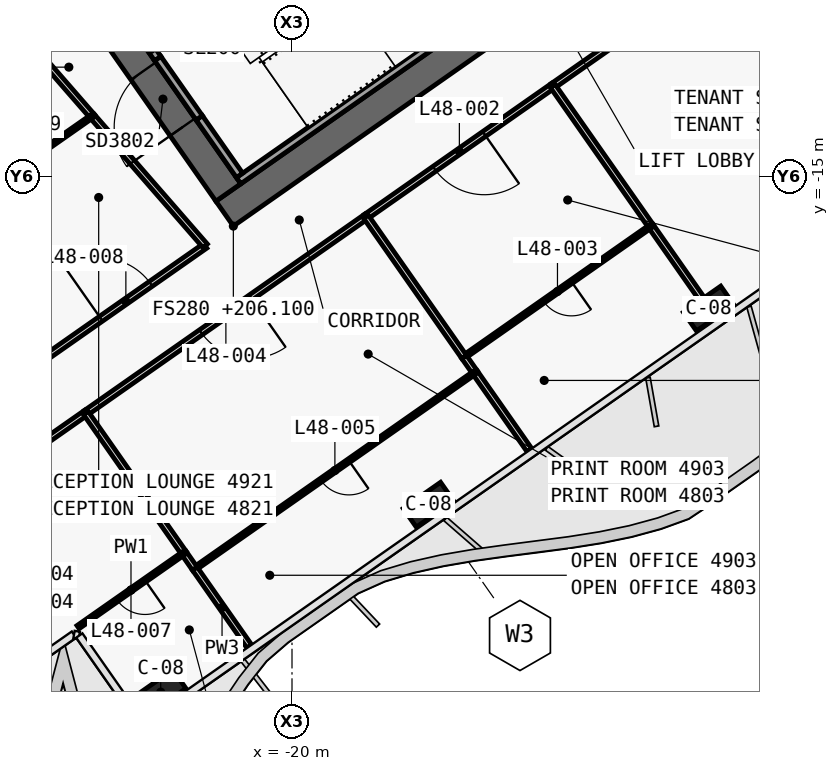
"""IFC4 building model, lengths in metres.
Left out: names, types, materials, properties, quantities, classifications, styles, units other than length and angle.
Written with IfcOpenShell. Run it as: python <this file> out.ifc"""

import sys

from ifc_helpers import new_model, si_unit, direction, frame, frame_2d, origin, origin_2d, place, context, subcontext, project, spatial, polyline, rectangle, outline, extrude, element, fill, save


model = new_model("IFC4")
c1 = context("Model", 3, precision=1e-05, world=origin(), true_north=direction((0.0, 1.0)))
c2 = subcontext(c1, "Body", "Model", "MODEL_VIEW")
j1 = project(units=[si_unit("LENGTHUNIT", "METRE"), si_unit("PLANEANGLEUNIT", "RADIAN")], contexts=[c1])
p1 = place(None, origin())
s1 = spatial("IfcSite", under=j1, at=p1, CompositionType="ELEMENT")
p2 = place(p1, origin())
s2 = spatial("IfcBuilding", under=s1, at=p2, CompositionType="ELEMENT")
p3 = place(p2, frame((0.0, 0.0, 206.1)))
s3 = spatial("IfcBuildingStorey", under=s2, at=p3, CompositionType="ELEMENT", Elevation=206.1)
p4 = place(p3, frame((0.029, -0.712, 0.0), z_axis=(0.0, 0.0, 1.0), x_axis=(-0.819151758019, -0.573576845187, 0.0)))
e1 = element("IfcWall", 1, at=p4, inside=s3, PredefinedType="SHEAR", context=c2, shape_type="SweptSolid", body=[
    extrude(outline(polyline([(26.616, 0.4), (0.56, 0.4), (-0.0, -0.4), (26.616, -0.4), (26.616, 0.4)])), origin(), (0.0, 0.0, 1.0), 3.9),
])
p5 = place(p4, frame((2.966, 0.0, 0.0)))
e2 = element("IfcOpeningElement", 2, at=p5, cuts=e1, PredefinedType="OPENING", context=c2, shape_type="SweptSolid", body=[
    extrude(rectangle(XDim=2.4, YDim=2.1, at=frame_2d((1.2, 1.05))), frame((0.0, 0.41, 0.0), z_axis=(0.0, -1.0, 0.0), x_axis=(1.0, 0.0, 0.0)), (0.0, 0.0, 1.0), 0.82),
])
p6 = place(p4, frame((11.916, 0.0, 0.0)))
e3 = element("IfcOpeningElement", 3, at=p6, cuts=e1, PredefinedType="OPENING", context=c2, shape_type="SweptSolid", body=[
    extrude(rectangle(XDim=2.4, YDim=2.1, at=frame_2d((1.2, 1.05))), frame((0.0, 0.41, 0.0), z_axis=(0.0, -1.0, 0.0), x_axis=(1.0, 0.0, 0.0)), (0.0, 0.0, 1.0), 0.82),
])
p7 = place(p3, frame((-21.675, -15.421, 0.0), z_axis=(0.0, 0.0, 1.0), x_axis=(-0.573581815061, 0.819148278049, 0.0)))
e4 = element("IfcWall", 4, at=p7, inside=s3, PredefinedType="SHEAR", context=c2, shape_type="SweptSolid", body=[
    extrude(outline(polyline([(0.0, 0.4), (0.0, -0.4), (9.6, -0.4), (9.6, 0.4), (0.0, 0.4)])), origin(), (0.0, 0.0, 1.0), 3.9),
])
p8 = place(p7, frame((6.3, 0.0, 0.0)))
e5 = element("IfcOpeningElement", 5, at=p8, cuts=e4, PredefinedType="OPENING", context=c2, shape_type="SweptSolid", body=[
    extrude(rectangle(XDim=1.8, YDim=2.1, at=frame_2d((0.9, 1.05))), frame((0.0, 0.41, 0.0), z_axis=(0.0, -1.0, 0.0), x_axis=(1.0, 0.0, 0.0)), (0.0, 0.0, 1.0), 0.82),
])
p9 = place(p7, frame((2.1, 0.0, 0.0)))
e6 = element("IfcOpeningElement", 6, at=p9, cuts=e4, PredefinedType="OPENING", context=c2, shape_type="SweptSolid", body=[
    extrude(rectangle(XDim=1.8, YDim=2.1, at=frame_2d((0.9, 1.05))), frame((0.0, 0.41, 0.0), z_axis=(0.0, -1.0, 0.0), x_axis=(1.0, 0.0, 0.0)), (0.0, 0.0, 1.0), 0.82),
])
for number, where, z_axis, x_axis in (
    (7, (-9.038, -18.475, 0.0), (0.0, 0.0, 1.0), (-0.819, -0.574, 0.0)),
    (8, (-16.41, -23.637, 0.0), (0.0, 0.0, 1.0), (-0.819, -0.574, 0.0)),
    (9, (-23.455, -28.57, 0.0), (0.0, 0.0, 1.0), (-0.819, -0.574, 0.0)),
):
    element("IfcColumn", number, at=place(p3, frame(where, z_axis=z_axis, x_axis=x_axis)), inside=s3, PredefinedType="COLUMN", context=c2, shape_type="SweptSolid", body=[
        extrude(rectangle(XDim=1.2, YDim=0.6, at=origin_2d()), origin(), (0.0, 0.0, 1.0), 3.9),
    ])
p10 = place(p3, frame((-14.851, -10.521, 0.0), z_axis=(0.0, 0.0, 1.0), x_axis=(-0.819141584393, -0.57359137434, 0.0)))
e10 = element("IfcWall", 10, at=p10, inside=s3, PredefinedType="SOLIDWALL", context=c2, shape_type="SweptSolid", body=[
    extrude(rectangle(XDim=8.0, YDim=0.2, at=frame_2d((4.0, 0.0))), origin(), (0.0, 0.0, 1.0), 3.62),
])
p11 = place(p3, frame((-21.38, -14.97, 0.0), z_axis=(0.0, 0.0, 1.0), x_axis=(-0.573559770908, 0.819163713305, 0.0)))
e11 = element("IfcWall", 11, at=p11, inside=s3, PredefinedType="SOLIDWALL", context=c2, shape_type="SweptSolid", body=[
    extrude(rectangle(XDim=1.85, YDim=0.2, at=frame_2d((0.925, 0.0))), origin(), (0.0, 0.0, 1.0), 3.62),
])
p12 = place(p3, frame((-23.531, -11.898, 0.0), z_axis=(0.0, 0.0, 1.0), x_axis=(-0.573708088123, 0.819059844958, 0.0)))
e12 = element("IfcWall", 12, at=p12, inside=s3, PredefinedType="SOLIDWALL", context=c2, shape_type="SweptSolid", body=[
    extrude(rectangle(XDim=0.6, YDim=0.2, at=frame_2d((0.3, 0.0))), origin(), (0.0, 0.0, 1.0), 3.62),
])
p13 = place(p3, frame((-22.441, -13.455, 2.15), z_axis=(0.0, 0.0, 1.0), x_axis=(-0.573591692345, 0.819141361715, 0.0)))
e13 = element("IfcWall", 13, at=p13, inside=s3, PredefinedType="SOLIDWALL", context=c2, shape_type="SweptSolid", body=[
    extrude(rectangle(XDim=1.9, YDim=0.2, at=frame_2d((0.95, 0.0))), origin(), (0.0, 0.0, 1.0), 1.47),
])
p14 = place(p3, frame((-26.46, -19.748, 0.0), z_axis=(0.0, 0.0, 1.0), x_axis=(0.819171182807, 0.573549102744, 0.0)))
e14 = element("IfcWall", 14, at=p14, inside=s3, PredefinedType="PARTITIONING", context=c2, shape_type="SweptSolid", body=[
    extrude(rectangle(XDim=5.099, YDim=0.15, at=frame_2d((2.55, 0.0))), origin(), (0.0, 0.0, 1.0), 3.62),
])
p15 = place(p14, frame((1.75, 0.0, 0.0)))
e15 = element("IfcOpeningElement", 15, at=p15, cuts=e14, PredefinedType="OPENING", context=c2, shape_type="SweptSolid", body=[
    extrude(rectangle(XDim=1.6, YDim=2.1, at=frame_2d((0.8, 1.05))), frame((0.0, 0.085, 0.0), z_axis=(0.0, -1.0, 0.0), x_axis=(1.0, 0.0, 0.0)), (0.0, 0.0, 1.0), 0.17),
])
p16 = place(p3, frame((-5.766, -7.456, 0.0), z_axis=(0.0, 0.0, 1.0), x_axis=(-0.81915291695, -0.57357519006, 0.0)))
e16 = element("IfcWall", 16, at=p16, inside=s3, PredefinedType="PARTITIONING", context=c2, shape_type="SweptSolid", body=[
    extrude(rectangle(XDim=9.002, YDim=0.15, at=frame_2d((4.501, 0.0))), origin(), (0.0, 0.0, 1.0), 3.0),
])
p17 = place(p16, frame((3.701, 0.0, 0.0)))
e17 = element("IfcOpeningElement", 17, at=p17, cuts=e16, PredefinedType="OPENING", context=c2, shape_type="SweptSolid", body=[
    extrude(rectangle(XDim=1.6, YDim=2.1, at=frame_2d((0.8, 1.05))), frame((0.0, 0.085, 0.0), z_axis=(0.0, -1.0, 0.0), x_axis=(1.0, 0.0, 0.0)), (0.0, 0.0, 1.0), 0.17),
])
p18 = place(p3, frame((-13.137, -12.617, 0.0), z_axis=(0.0, 0.0, 1.0), x_axis=(-0.819165052243, -0.573557858619, 0.0)))
e18 = element("IfcWall", 18, at=p18, inside=s3, PredefinedType="PARTITIONING", context=c2, shape_type="SweptSolid", body=[
    extrude(rectangle(XDim=6.004, YDim=0.15, at=frame_2d((3.002, 0.0))), origin(), (0.0, 0.0, 1.0), 3.0),
])
p19 = place(p18, frame((2.202, 0.0, 0.0)))
e19 = element("IfcOpeningElement", 19, at=p19, cuts=e18, PredefinedType="OPENING", context=c2, shape_type="SweptSolid", body=[
    extrude(rectangle(XDim=1.6, YDim=2.1, at=frame_2d((0.8, 1.05))), frame((0.0, 0.085, 0.0), z_axis=(0.0, -1.0, 0.0), x_axis=(1.0, 0.0, 0.0)), (0.0, 0.0, 1.0), 0.17),
])
p20 = place(p3, frame((-18.052, -16.058, 0.0), z_axis=(0.0, 0.0, 1.0), x_axis=(-0.819142740634, -0.573589723117, 0.0)))
e20 = element("IfcWall", 20, at=p20, inside=s3, PredefinedType="PARTITIONING", context=c2, shape_type="SweptSolid", body=[
    extrude(rectangle(XDim=9.004, YDim=0.15, at=frame_2d((4.502, 0.0))), origin(), (0.0, 0.0, 1.0), 3.0),
])
p21 = place(p20, frame((3.702, 0.0, 0.0)))
e21 = element("IfcOpeningElement", 21, at=p21, cuts=e20, PredefinedType="OPENING", context=c2, shape_type="SweptSolid", body=[
    extrude(rectangle(XDim=1.6, YDim=2.1, at=frame_2d((0.8, 1.05))), frame((0.0, 0.085, 0.0), z_axis=(0.0, -1.0, 0.0), x_axis=(1.0, 0.0, 0.0)), (0.0, 0.0, 1.0), 0.17),
])
p22 = place(p3, frame((-25.424, -21.22, 0.0), z_axis=(0.0, 0.0, 1.0), x_axis=(-0.819154877477, -0.573572390118, 0.0)))
e22 = element("IfcWall", 22, at=p22, inside=s3, PredefinedType="PARTITIONING", context=c2, shape_type="SweptSolid", body=[
    extrude(rectangle(XDim=6.402, YDim=0.15, at=frame_2d((3.201, 0.0))), origin(), (0.0, 0.0, 1.0), 2.9),
])
p23 = place(p22, frame((2.401, 0.0, 0.0)))
e23 = element("IfcOpeningElement", 23, at=p23, cuts=e22, PredefinedType="OPENING", context=c2, shape_type="SweptSolid", body=[
    extrude(rectangle(XDim=1.6, YDim=2.1, at=frame_2d((0.8, 1.05))), frame((0.0, 0.085, 0.0), z_axis=(0.0, -1.0, 0.0), x_axis=(1.0, 0.0, 0.0)), (0.0, 0.0, 1.0), 0.17),
])
p24 = place(p3, frame((-25.256, -13.413, 0.0), z_axis=(0.0, 0.0, 1.0), x_axis=(-0.656776293518, 0.75408547279, 0.0)))
e24 = element("IfcWall", 24, at=p24, inside=s3, PredefinedType="PARTITIONING", context=c2, shape_type="SweptSolid", body=[
    extrude(rectangle(XDim=2.012, YDim=0.15, at=frame_2d((1.006, 0.0))), origin(), (0.0, 0.0, 1.0), 3.62),
])
p25 = place(p3, frame((-22.284, -16.826, 0.0), z_axis=(0.0, 0.0, 1.0), x_axis=(-0.656755036803, 0.754103985955, 0.0)))
e25 = element("IfcWall", 25, at=p25, inside=s3, PredefinedType="PARTITIONING", context=c2, shape_type="SweptSolid", body=[
    extrude(rectangle(XDim=4.529, YDim=0.15, at=frame_2d((2.265, 0.0))), origin(), (0.0, 0.0, 1.0), 3.62),
])
p26 = place(p3, frame((-29.04, -16.06, 0.0), z_axis=(0.0, 0.0, 1.0), x_axis=(0.819135037256, 0.573600724145, 0.0)))
e26 = element("IfcWall", 26, at=p26, inside=s3, PredefinedType="PARTITIONING", context=c2, shape_type="SweptSolid", body=[
    extrude(rectangle(XDim=4.618, YDim=0.1, at=frame_2d((2.309, 0.0))), origin(), (0.0, 0.0, 1.0), 3.62),
])
p27 = place(p26, frame((1.859, 0.0, 0.0)))
e27 = element("IfcOpeningElement", 27, at=p27, cuts=e26, PredefinedType="OPENING", context=c2, shape_type="SweptSolid", body=[
    extrude(rectangle(XDim=0.9, YDim=2.1, at=frame_2d((0.45, 1.05))), frame((0.0, 0.06, 0.0), z_axis=(0.0, -1.0, 0.0), x_axis=(1.0, 0.0, 0.0)), (0.0, 0.0, 1.0), 0.12),
])
p28 = place(p3, frame((-9.221, -18.213, 0.0), z_axis=(0.0, 0.0, 1.0), x_axis=(-0.573553724287, 0.819167946978, 0.0)))
e28 = element("IfcWall", 28, at=p28, inside=s3, PredefinedType="PARTITIONING", context=c2, shape_type="SweptSolid", body=[
    extrude(rectangle(XDim=2.331, YDim=0.15, at=frame_2d((1.166, 0.0))), origin(), (0.0, 0.0, 1.0), 3.0),
])
p29 = place(p3, frame((-10.556, -16.306, 0.0), z_axis=(0.0, 0.0, 1.0), x_axis=(-0.573564243949, 0.819160581365, 0.0)))
e29 = element("IfcWall", 29, at=p29, inside=s3, PredefinedType="PARTITIONING", context=c2, shape_type="SweptSolid", body=[
    extrude(rectangle(XDim=4.502, YDim=0.15, at=frame_2d((2.251, 0.0))), origin(), (0.0, 0.0, 1.0), 3.0),
])
p30 = place(p3, frame((-10.557, -16.305, 0.0), z_axis=(0.0, 0.0, 1.0), x_axis=(-0.819130592339, -0.573607071691, 0.0)))
e30 = element("IfcWall", 30, at=p30, inside=s3, PredefinedType="PARTITIONING", context=c2, shape_type="SweptSolid", body=[
    extrude(rectangle(XDim=6.0, YDim=0.1, at=frame_2d((3.0, 0.0))), origin(), (0.0, 0.0, 1.0), 3.0),
])
p31 = place(p30, frame((2.55, 0.0, 0.0)))
e31 = element("IfcOpeningElement", 31, at=p31, cuts=e30, PredefinedType="OPENING", context=c2, shape_type="SweptSolid", body=[
    extrude(rectangle(XDim=0.9, YDim=2.1, at=frame_2d((0.45, 1.05))), frame((0.0, 0.06, 0.0), z_axis=(0.0, -1.0, 0.0), x_axis=(1.0, 0.0, 0.0)), (0.0, 0.0, 1.0), 0.12),
])
p32 = place(p3, frame((-13.752, -22.203, 0.0), z_axis=(0.0, 0.0, 1.0), x_axis=(-0.57356715775, 0.819158541157, 0.0)))
e32 = element("IfcWall", 32, at=p32, inside=s3, PredefinedType="PARTITIONING", context=c2, shape_type="SweptSolid", body=[
    extrude(rectangle(XDim=2.501, YDim=0.15, at=frame_2d((1.25, 0.0))), origin(), (0.0, 0.0, 1.0), 2.9),
])
p33 = place(p3, frame((-15.185, -20.157, 0.0), z_axis=(0.0, 0.0, 1.0), x_axis=(-0.573560455774, 0.819163233777, 0.0)))
e33 = element("IfcWall", 33, at=p33, inside=s3, PredefinedType="PARTITIONING", context=c2, shape_type="SweptSolid", body=[
    extrude(rectangle(XDim=0.501, YDim=0.15, at=frame_2d((0.25, 0.0))), origin(), (0.0, 0.0, 1.0), 3.62),
])
p34 = place(p3, frame((-15.472, -19.746, 0.0), z_axis=(0.0, 0.0, 1.0), x_axis=(-0.573622545156, 0.819119756622, 0.0)))
e34 = element("IfcWall", 34, at=p34, inside=s3, PredefinedType="PARTITIONING", context=c2, shape_type="SweptSolid", body=[
    extrude(rectangle(XDim=4.5, YDim=0.15, at=frame_2d((2.25, 0.0))), origin(), (0.0, 0.0, 1.0), 3.62),
])
p35 = place(p3, frame((-15.185, -20.156, 0.0), z_axis=(0.0, 0.0, 1.0), x_axis=(-0.819154173185, -0.573573395961, 0.0)))
e35 = element("IfcWall", 35, at=p35, inside=s3, PredefinedType="PARTITIONING", context=c2, shape_type="SweptSolid", body=[
    extrude(rectangle(XDim=9.0, YDim=0.1, at=frame_2d((4.5, 0.0))), origin(), (0.0, 0.0, 1.0), 3.0),
])
p36 = place(p35, frame((4.05, 0.0, 0.0)))
e36 = element("IfcOpeningElement", 36, at=p36, cuts=e35, PredefinedType="OPENING", context=c2, shape_type="SweptSolid", body=[
    extrude(rectangle(XDim=0.9, YDim=2.1, at=frame_2d((0.45, 1.05))), frame((0.0, 0.06, 0.0), z_axis=(0.0, -1.0, 0.0), x_axis=(1.0, 0.0, 0.0)), (0.0, 0.0, 1.0), 0.12),
])
p37 = place(p3, frame((-21.124, -27.365, 0.0), z_axis=(0.0, 0.0, 1.0), x_axis=(-0.573560689761, 0.819163069945, 0.0)))
e37 = element("IfcWall", 37, at=p37, inside=s3, PredefinedType="PARTITIONING", context=c2, shape_type="SweptSolid", body=[
    extrude(rectangle(XDim=2.499, YDim=0.15, at=frame_2d((1.25, 0.0))), origin(), (0.0, 0.0, 1.0), 2.9),
])
p38 = place(p3, frame((-22.558, -25.317, 0.0), z_axis=(0.0, 0.0, 1.0), x_axis=(-0.573560455774, 0.819163233777, 0.0)))
e38 = element("IfcWall", 38, at=p38, inside=s3, PredefinedType="PARTITIONING", context=c2, shape_type="SweptSolid", body=[
    extrude(rectangle(XDim=0.501, YDim=0.15, at=frame_2d((0.25, 0.0))), origin(), (0.0, 0.0, 1.0), 3.62),
])
p39 = place(p3, frame((-22.844, -24.909, 0.0), z_axis=(0.0, 0.0, 1.0), x_axis=(-0.573589723117, 0.819142740634, 0.0)))
e39 = element("IfcWall", 39, at=p39, inside=s3, PredefinedType="PARTITIONING", context=c2, shape_type="SweptSolid", body=[
    extrude(rectangle(XDim=4.502, YDim=0.15, at=frame_2d((2.251, 0.0))), origin(), (0.0, 0.0, 1.0), 3.62),
])
p40 = place(p3, frame((-22.844, -24.909, 0.0), z_axis=(0.0, 0.0, 1.0), x_axis=(-0.819150951061, -0.57357799764, 0.0)))
e40 = element("IfcWall", 40, at=p40, inside=s3, PredefinedType="PARTITIONING", context=c2, shape_type="SweptSolid", body=[
    extrude(rectangle(XDim=3.4, YDim=0.1, at=frame_2d((1.7, 0.0))), origin(), (0.0, 0.0, 1.0), 3.0),
])
p41 = place(p40, frame((1.25, 0.0, 0.0)))
e41 = element("IfcOpeningElement", 41, at=p41, cuts=e40, PredefinedType="OPENING", context=c2, shape_type="SweptSolid", body=[
    extrude(rectangle(XDim=0.9, YDim=2.1, at=frame_2d((0.45, 1.05))), frame((0.0, 0.06, 0.0), z_axis=(0.0, -1.0, 0.0), x_axis=(1.0, 0.0, 0.0)), (0.0, 0.0, 1.0), 0.12),
])
p42 = place(p9, origin())
e42 = element("IfcDoor", 42, at=p42, inside=s3, OperationType="DOUBLE_DOOR_SINGLE_SWING", PredefinedType="DOOR", context=c2, shape_type="SweptSolid", body=[
    extrude(rectangle(XDim=1.8, YDim=2.1, at=frame_2d((0.9, 1.05))), frame((0.0, 0.025, 0.0), z_axis=(0.0, -1.0, 0.0), x_axis=(1.0, 0.0, 0.0)), (0.0, 0.0, 1.0), 0.05),
])
fill(e6, e42)
p43 = place(p19, origin())
e43 = element("IfcDoor", 43, at=p43, inside=s3, OperationType="DOUBLE_DOOR_SINGLE_SWING", PredefinedType="DOOR", context=c2, shape_type="SweptSolid", body=[
    extrude(rectangle(XDim=1.6, YDim=2.1, at=frame_2d((0.8, 1.05))), frame((0.0, 0.025, 0.0), z_axis=(0.0, -1.0, 0.0), x_axis=(1.0, 0.0, 0.0)), (0.0, 0.0, 1.0), 0.05),
])
fill(e19, e43)
p44 = place(p31, origin())
e44 = element("IfcDoor", 44, at=p44, inside=s3, OperationType="SINGLE_SWING_LEFT", PredefinedType="DOOR", context=c2, shape_type="SweptSolid", body=[
    extrude(rectangle(XDim=0.9, YDim=2.1, at=frame_2d((0.45, 1.05))), frame((0.0, 0.025, 0.0), z_axis=(0.0, -1.0, 0.0), x_axis=(1.0, 0.0, 0.0)), (0.0, 0.0, 1.0), 0.05),
])
fill(e31, e44)
p45 = place(p21, origin())
e45 = element("IfcDoor", 45, at=p45, inside=s3, OperationType="DOUBLE_DOOR_SINGLE_SWING", PredefinedType="DOOR", context=c2, shape_type="SweptSolid", body=[
    extrude(rectangle(XDim=1.6, YDim=2.1, at=frame_2d((0.8, 1.05))), frame((0.0, 0.025, 0.0), z_axis=(0.0, -1.0, 0.0), x_axis=(1.0, 0.0, 0.0)), (0.0, 0.0, 1.0), 0.05),
])
fill(e21, e45)
p46 = place(p36, origin())
e46 = element("IfcDoor", 46, at=p46, inside=s3, OperationType="SINGLE_SWING_RIGHT", PredefinedType="DOOR", context=c2, shape_type="SweptSolid", body=[
    extrude(rectangle(XDim=0.9, YDim=2.1, at=frame_2d((0.45, 1.05))), frame((0.0, 0.025, 0.0), z_axis=(0.0, -1.0, 0.0), x_axis=(1.0, 0.0, 0.0)), (0.0, 0.0, 1.0), 0.05),
])
fill(e36, e46)
p47 = place(p41, origin())
e47 = element("IfcDoor", 47, at=p47, inside=s3, OperationType="SINGLE_SWING_RIGHT", PredefinedType="DOOR", context=c2, shape_type="SweptSolid", body=[
    extrude(rectangle(XDim=0.9, YDim=2.1, at=frame_2d((0.45, 1.05))), frame((0.0, 0.025, 0.0), z_axis=(0.0, -1.0, 0.0), x_axis=(1.0, 0.0, 0.0)), (0.0, 0.0, 1.0), 0.05),
])
fill(e41, e47)
p48 = place(p15, origin())
e48 = element("IfcDoor", 48, at=p48, inside=s3, OperationType="DOUBLE_DOOR_SINGLE_SWING", PredefinedType="DOOR", context=c2, shape_type="SweptSolid", body=[
    extrude(rectangle(XDim=1.6, YDim=2.1, at=frame_2d((0.8, 1.05))), frame((0.0, 0.025, 0.0), z_axis=(0.0, -1.0, 0.0), x_axis=(1.0, 0.0, 0.0)), (0.0, 0.0, 1.0), 0.05),
])
fill(e15, e48)
save(model, sys.argv[1])
